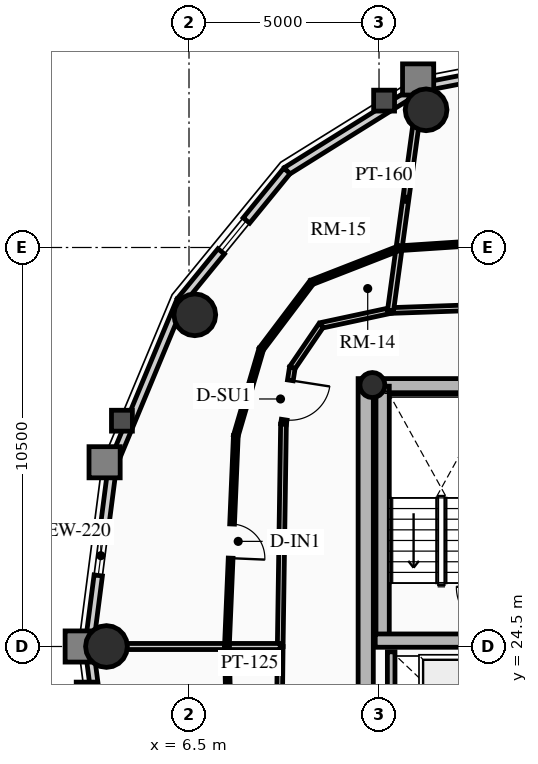
"""IFC4 building model, lengths in metres.
Left out: names, types, materials, properties, quantities, classifications, styles, units other than length and angle.
Written with IfcOpenShell. Run it as: python <this file> out.ifc"""

import sys

from ifc_helpers import new_model, si_unit, direction, frame, frame_2d, origin, origin_2d, place, context, subcontext, project, spatial, rectangle, circle, hollow_circle, extrude, source, transform, mapped, element, fill, save


model = new_model("IFC4")
c1 = context("Model", 3, precision=1e-05, world=origin(), true_north=direction((0.0, 1.0)))
c2 = subcontext(c1, "Body", "Model", "MODEL_VIEW")
j1 = project(units=[si_unit("LENGTHUNIT", "METRE"), si_unit("PLANEANGLEUNIT", "RADIAN")], contexts=[c1])
p1 = place(None, origin())
s1 = spatial("IfcSite", under=j1, at=p1, CompositionType="ELEMENT")
p2 = place(p1, origin())
s2 = spatial("IfcBuilding", under=s1, at=p2, CompositionType="ELEMENT")
p3 = place(p2, frame((0.0, 0.0, 226.05)))
s3 = spatial("IfcBuildingStorey", under=s2, at=p3, CompositionType="ELEMENT", Elevation=226.05)
p4 = place(p3, frame((11.15, 17.45, 0.0), z_axis=(0.0, 0.0, 1.0), x_axis=(0.0, 1.0, 0.0)))
e1 = element("IfcWall", 1, at=p4, inside=s3, PredefinedType="SHEAR", context=c2, shape_type="SweptSolid", body=[
    extrude(rectangle(XDim=14.1, YDim=0.4, at=frame_2d((7.05, 0.0))), origin(), (0.0, 0.0, 1.0), 3.2),
])
p5 = place(p3, frame((11.15, 31.35, 0.0), z_axis=(0.0, 0.0, 1.0), x_axis=(1.0, 0.0, 0.0)))
e2 = element("IfcWall", 2, at=p5, inside=s3, PredefinedType="SHEAR", context=c2, shape_type="SweptSolid", body=[
    extrude(rectangle(XDim=10.7, YDim=0.4, at=frame_2d((5.35, 0.0))), origin(), (0.0, 0.0, 1.0), 3.2),
])
m1 = source(origin(), c2, "Body", "SweptSolid", [
    extrude(rectangle(XDim=1.5, YDim=2.02, at=frame_2d((0.75, 1.01))), frame((0.0, 0.21, 0.0), z_axis=(0.0, -1.0, 0.0), x_axis=(1.0, 0.0, 0.0)), (0.0, 0.0, 1.0), 0.42),
])
p6 = place(p5, frame((4.6, 0.0, 0.0)))
e3 = element("IfcOpeningElement", 3, at=p6, cuts=e2, PredefinedType="OPENING", context=c2, shape_type="MappedRepresentation", body=[
    mapped(m1, transform((0.0, 0.0, 0.0), x_axis=(1.0, 0.0, 0.0), y_axis=(0.0, 1.0, 0.0), z_axis=(0.0, 0.0, 1.0), scale=1.0)),
])
p7 = place(p3, frame((11.595, 24.655, 0.0), z_axis=(0.0, 0.0, 1.0), x_axis=(0.0, 1.0, 0.0)))
e4 = element("IfcWall", 4, at=p7, inside=s3, PredefinedType="SHEAR", context=c2, shape_type="SweptSolid", body=[
    extrude(rectangle(XDim=6.695, YDim=0.35, at=frame_2d((3.348, 0.0))), origin(), (0.0, 0.0, 1.0), 3.2),
])
p8 = place(p3, frame((11.4, 24.655, 0.0), z_axis=(0.0, 0.0, 1.0), x_axis=(1.0, 0.0, 0.0)))
e5 = element("IfcWall", 5, at=p8, inside=s3, PredefinedType="SHEAR", context=c2, shape_type="SweptSolid", body=[
    extrude(rectangle(XDim=3.285, YDim=0.35, at=frame_2d((1.643, 0.0))), origin(), (0.0, 0.0, 1.0), 3.2),
])
p9 = place(p3, frame((11.325, 31.38, 0.0), z_axis=(0.0, 0.0, 1.0), x_axis=(1.0, 0.0, 0.0)))
e6 = element("IfcColumn", 6, at=p9, inside=s3, PredefinedType="COLUMN", context=c2, shape_type="SweptSolid", body=[
    extrude(hollow_circle(Radius=0.33, WallThickness=0.025, at=origin_2d()), origin(), (0.0, 0.0, 1.0), 3.2),
])
for number, where, z_axis, x_axis in (
    (7, (12.739, 38.623, 0.0), (0.0, 0.0, 1.0), (1.0, 0.0, 0.0)),
    (8, (6.653, 33.229, 0.0), (0.0, 0.0, 1.0), (1.0, 0.0, 0.0)),
    (9, (4.328, 24.5, 0.0), (0.0, 0.0, 1.0), (1.0, 0.0, 0.0)),
):
    element("IfcColumn", number, at=place(p3, frame(where, z_axis=z_axis, x_axis=x_axis)), inside=s3, PredefinedType="USERDEFINED", context=c2, shape_type="SweptSolid", body=[
        extrude(circle(Radius=0.55, at=origin_2d()), origin(), (0.0, 0.0, 1.0), 3.2),
    ])
p10 = place(p3, frame((12.597, 39.213, 0.0), z_axis=(0.0, 0.0, 1.0), x_axis=(0.981700307484, 0.190432419211, 0.0)))
e10 = element("IfcWall", 10, at=p10, inside=s3, PredefinedType="SOLIDWALL", context=c2, shape_type="SweptSolid", body=[
    extrude(rectangle(XDim=3.976, YDim=0.22, at=frame_2d((1.988, 0.0))), origin(), (0.0, 0.0, 1.0), 2.612),
])
m2 = source(origin(), c2, "Body", "SweptSolid", [
    extrude(rectangle(XDim=1.05, YDim=1.3, at=frame_2d((0.525, 0.65))), frame((0.0, 0.12, 0.0), z_axis=(0.0, -1.0, 0.0), x_axis=(1.0, 0.0, 0.0)), (0.0, 0.0, 1.0), 0.24),
])
p11 = place(p10, frame((1.463, 0.0, 0.65)))
e11 = element("IfcOpeningElement", 11, at=p11, cuts=e10, PredefinedType="OPENING", context=c2, shape_type="MappedRepresentation", body=[
    mapped(m2, transform((0.0, 0.0, 0.0), x_axis=(1.0, 0.0, 0.0), y_axis=(0.0, 1.0, 0.0), z_axis=(0.0, 0.0, 1.0), scale=1.0)),
])
p12 = place(p3, frame((9.076, 37.015, 0.0), z_axis=(0.0, 0.0, 1.0), x_axis=(0.848318713376, 0.529485939886, 0.0)))
e12 = element("IfcWall", 12, at=p12, inside=s3, PredefinedType="SOLIDWALL", context=c2, shape_type="SweptSolid", body=[
    extrude(rectangle(XDim=4.15, YDim=0.22, at=frame_2d((2.075, 0.0))), origin(), (0.0, 0.0, 1.0), 2.612),
])
p13 = place(p3, frame((6.282, 33.593, 0.0), z_axis=(0.0, 0.0, 1.0), x_axis=(0.632467166636, 0.774587169483, 0.0)))
e13 = element("IfcWall", 13, at=p13, inside=s3, PredefinedType="SOLIDWALL", context=c2, shape_type="SweptSolid", body=[
    extrude(rectangle(XDim=4.418, YDim=0.22, at=frame_2d((2.209, 0.0))), origin(), (0.0, 0.0, 1.0), 2.612),
])
p14 = place(p13, frame((1.684, 0.0, 0.65)))
e14 = element("IfcOpeningElement", 14, at=p14, cuts=e13, PredefinedType="OPENING", context=c2, shape_type="MappedRepresentation", body=[
    mapped(m2, transform((0.0, 0.0, 0.0), x_axis=(1.0, 0.0, 0.0), y_axis=(0.0, 1.0, 0.0), z_axis=(0.0, 0.0, 1.0), scale=1.0)),
])
p15 = place(p3, frame((4.488, 29.281, 0.0), z_axis=(0.0, 0.0, 1.0), x_axis=(0.384036305194, 0.923317993052, 0.0)))
e15 = element("IfcWall", 15, at=p15, inside=s3, PredefinedType="SOLIDWALL", context=c2, shape_type="SweptSolid", body=[
    extrude(rectangle(XDim=4.671, YDim=0.22, at=frame_2d((2.335, 0.0))), origin(), (0.0, 0.0, 1.0), 2.612),
])
p16 = place(p3, frame((3.87, 24.5, 0.0), z_axis=(0.0, 0.0, 1.0), x_axis=(0.128241318541, 0.991742993027, 0.0)))
e16 = element("IfcWall", 16, at=p16, inside=s3, PredefinedType="SOLIDWALL", context=c2, shape_type="SweptSolid", body=[
    extrude(rectangle(XDim=4.82, YDim=0.22, at=frame_2d((2.41, 0.0))), origin(), (0.0, 0.0, 1.0), 2.612),
])
p17 = place(p16, frame((1.885, 0.0, 0.65)))
e17 = element("IfcOpeningElement", 17, at=p17, cuts=e16, PredefinedType="OPENING", context=c2, shape_type="MappedRepresentation", body=[
    mapped(m2, transform((0.0, 0.0, 0.0), x_axis=(1.0, 0.0, 0.0), y_axis=(0.0, 1.0, 0.0), z_axis=(0.0, 0.0, 1.0), scale=1.0)),
])
p18 = place(p3, frame((4.488, 19.719, 0.0), z_axis=(0.0, 0.0, 1.0), x_axis=(-0.128241318541, 0.991742993027, 0.0)))
e18 = element("IfcWall", 18, at=p18, inside=s3, PredefinedType="SOLIDWALL", context=c2, shape_type="SweptSolid", body=[
    extrude(rectangle(XDim=4.82, YDim=0.22, at=frame_2d((2.41, 0.0))), origin(), (0.0, 0.0, 1.0), 2.612),
])
p19 = place(p3, frame((11.82, 21.92, 0.0), z_axis=(0.0, 0.0, 1.0), x_axis=(0.0, 1.0, 0.0)))
e19 = element("IfcWall", 19, at=p19, inside=s3, PredefinedType="SHEAR", context=c2, shape_type="SweptSolid", body=[
    extrude(rectangle(XDim=2.44, YDim=0.2, at=frame_2d((1.22, 0.0))), origin(), (0.0, 0.0, 1.0), 3.2),
])
p20 = place(p3, frame((18.082, 33.56, 0.0), z_axis=(0.0, 0.0, 1.0), x_axis=(-0.999399009709, -0.034664382185, 0.0)))
e20 = element("IfcWall", 20, at=p20, inside=s3, PredefinedType="PARTITIONING", context=c2, shape_type="SweptSolid", body=[
    extrude(rectangle(XDim=6.282, YDim=0.15, at=frame_2d((3.141, 0.0))), origin(), (0.0, 0.0, 1.0), 2.545),
])
p21 = place(p3, frame((11.803, 33.342, 0.0), z_axis=(0.0, 0.0, 1.0), x_axis=(-0.977750742783, -0.209770076483, 0.0)))
e21 = element("IfcWall", 21, at=p21, inside=s3, PredefinedType="PARTITIONING", context=c2, shape_type="SweptSolid", body=[
    extrude(rectangle(XDim=1.868, YDim=0.15, at=frame_2d((0.934, 0.0))), origin(), (0.0, 0.0, 1.0), 2.545),
])
p22 = place(p3, frame((9.977, 32.95, 0.0), z_axis=(0.0, 0.0, 1.0), x_axis=(-0.563291804539, -0.826258036535, 0.0)))
e22 = element("IfcWall", 22, at=p22, inside=s3, PredefinedType="PARTITIONING", context=c2, shape_type="SweptSolid", body=[
    extrude(rectangle(XDim=1.346, YDim=0.15, at=frame_2d((0.673, 0.0))), origin(), (0.0, 0.0, 1.0), 2.612),
])
p23 = place(p3, frame((9.219, 31.838, 0.0), z_axis=(0.0, 0.0, 1.0), x_axis=(-0.154065528966, -0.98806063214, 0.0)))
e23 = element("IfcWall", 23, at=p23, inside=s3, PredefinedType="PARTITIONING", context=c2, shape_type="SweptSolid", body=[
    extrude(rectangle(XDim=1.507, YDim=0.15, at=frame_2d((0.753, 0.0))), origin(), (0.0, 0.0, 1.0), 2.545),
])
m3 = source(origin(), c2, "Body", "SweptSolid", [
    extrude(rectangle(XDim=1.05, YDim=2.015, at=frame_2d((0.525, 1.007))), frame((0.0, 0.085, 0.0), z_axis=(0.0, -1.0, 0.0), x_axis=(1.0, 0.0, 0.0)), (0.0, 0.0, 1.0), 0.17),
])
p24 = place(p23, frame((0.337, 0.0, 0.0)))
e24 = element("IfcOpeningElement", 24, at=p24, cuts=e23, PredefinedType="OPENING", context=c2, shape_type="MappedRepresentation", body=[
    mapped(m3, transform((0.0, 0.0, 0.0), x_axis=(1.0, 0.0, 0.0), y_axis=(0.0, 1.0, 0.0), z_axis=(0.0, 0.0, 1.0), scale=1.0)),
])
p25 = place(p3, frame((8.986, 30.349, 0.0), z_axis=(0.0, 0.0, 1.0), x_axis=(-0.014775478218, -0.999890836663, 0.0)))
e25 = element("IfcWall", 25, at=p25, inside=s3, PredefinedType="PARTITIONING", context=c2, shape_type="SweptSolid", body=[
    extrude(rectangle(XDim=5.849, YDim=0.15, at=frame_2d((2.925, 0.0))), origin(), (0.0, 0.0, 1.0), 2.975),
])
p26 = place(p3, frame((8.9, 24.5, 0.0), z_axis=(0.0, 0.0, 1.0), x_axis=(-0.011416369353, -0.999934831132, 0.0)))
e26 = element("IfcWall", 26, at=p26, inside=s3, PredefinedType="PARTITIONING", context=c2, shape_type="SweptSolid", body=[
    extrude(rectangle(XDim=5.967, YDim=0.15, at=frame_2d((2.983, 0.0))), origin(), (0.0, 0.0, 1.0), 2.612),
])
p27 = place(p3, frame((11.803, 33.342, 0.0), z_axis=(0.0, 0.0, 1.0), x_axis=(0.135452591041, 0.990783828885, 0.0)))
e27 = element("IfcWall", 27, at=p27, inside=s3, PredefinedType="PARTITIONING", context=c2, shape_type="SweptSolid", body=[
    extrude(rectangle(XDim=5.906, YDim=0.16, at=frame_2d((2.953, 0.0))), origin(), (0.0, 0.0, 1.0), 2.612),
])
p28 = place(p3, frame((8.9, 24.5, 0.0), z_axis=(0.0, 0.0, 1.0), x_axis=(-1.0, 0.0, 0.0)))
e28 = element("IfcWall", 28, at=p28, inside=s3, PredefinedType="PARTITIONING", context=c2, shape_type="SweptSolid", body=[
    extrude(rectangle(XDim=5.01, YDim=0.16, at=frame_2d((2.505, 0.0))), origin(), (0.0, 0.0, 1.0), 2.612),
])
p29 = place(p3, frame((17.639, 35.349, 0.0), z_axis=(0.0, 0.0, 1.0), x_axis=(-0.997849042159, -0.065553711275, 0.0)))
e29 = element("IfcWall", 29, at=p29, inside=s3, PredefinedType="PARTITIONING", context=c2, shape_type="SweptSolid", body=[
    extrude(rectangle(XDim=5.624, YDim=0.125, at=frame_2d((2.812, 0.0))), origin(), (0.0, 0.0, 1.0), 2.545),
])
m4 = source(origin(), c2, "Body", "SweptSolid", [
    extrude(rectangle(XDim=0.9, YDim=2.005, at=frame_2d((0.45, 1.002))), frame((0.0, 0.073, 0.0), z_axis=(0.0, -1.0, 0.0), x_axis=(1.0, 0.0, 0.0)), (0.0, 0.0, 1.0), 0.145),
])
p30 = place(p29, frame((2.362, 0.0, 0.0)))
e30 = element("IfcOpeningElement", 30, at=p30, cuts=e29, PredefinedType="OPENING", context=c2, shape_type="MappedRepresentation", body=[
    mapped(m4, transform((0.0, 0.0, 0.0), x_axis=(1.0, 0.0, 0.0), y_axis=(0.0, 1.0, 0.0), z_axis=(0.0, 0.0, 1.0), scale=1.0)),
])
p31 = place(p3, frame((12.027, 34.98, 0.0), z_axis=(0.0, 0.0, 1.0), x_axis=(-0.931701760683, -0.363224213317, 0.0)))
e31 = element("IfcWall", 31, at=p31, inside=s3, PredefinedType="PARTITIONING", context=c2, shape_type="SweptSolid", body=[
    extrude(rectangle(XDim=2.468, YDim=0.125, at=frame_2d((1.234, 0.0))), origin(), (0.0, 0.0, 1.0), 2.545),
])
p32 = place(p3, frame((9.728, 34.084, 0.0), z_axis=(0.0, 0.0, 1.0), x_axis=(-0.602426891997, -0.798174066103, 0.0)))
e32 = element("IfcWall", 32, at=p32, inside=s3, PredefinedType="PARTITIONING", context=c2, shape_type="SweptSolid", body=[
    extrude(rectangle(XDim=2.203, YDim=0.125, at=frame_2d((1.101, 0.0))), origin(), (0.0, 0.0, 1.0), 2.612),
])
p33 = place(p3, frame((8.401, 32.326, 0.0), z_axis=(0.0, 0.0, 1.0), x_axis=(-0.281681886596, -0.959507850288, 0.0)))
e33 = element("IfcWall", 33, at=p33, inside=s3, PredefinedType="PARTITIONING", context=c2, shape_type="SweptSolid", body=[
    extrude(rectangle(XDim=2.374, YDim=0.125, at=frame_2d((1.187, 0.0))), origin(), (0.0, 0.0, 1.0), 2.545),
])
p34 = place(p3, frame((7.732, 30.048, 0.0), z_axis=(0.0, 0.0, 1.0), x_axis=(-0.042296211955, -0.999105114817, 0.0)))
e34 = element("IfcWall", 34, at=p34, inside=s3, PredefinedType="PARTITIONING", context=c2, shape_type="SweptSolid", body=[
    extrude(rectangle(XDim=5.553, YDim=0.125, at=frame_2d((2.776, 0.0))), origin(), (0.0, 0.0, 1.0), 2.975),
])
p35 = place(p34, frame((2.326, 0.0, 0.0)))
e35 = element("IfcOpeningElement", 35, at=p35, cuts=e34, PredefinedType="OPENING", context=c2, shape_type="MappedRepresentation", body=[
    mapped(m4, transform((0.0, 0.0, 0.0), x_axis=(1.0, 0.0, 0.0), y_axis=(0.0, 1.0, 0.0), z_axis=(0.0, 0.0, 1.0), scale=1.0)),
])
p36 = place(p3, frame((7.497, 24.5, 0.0), z_axis=(0.0, 0.0, 1.0), x_axis=(0.021927972859, -0.999759553096, 0.0)))
e36 = element("IfcWall", 36, at=p36, inside=s3, PredefinedType="PARTITIONING", context=c2, shape_type="SweptSolid", body=[
    extrude(rectangle(XDim=5.634, YDim=0.125, at=frame_2d((2.817, 0.0))), origin(), (0.0, 0.0, 1.0), 2.612),
])
p37 = place(p36, frame((2.367, 0.0, 0.0)))
e37 = element("IfcOpeningElement", 37, at=p37, cuts=e36, PredefinedType="OPENING", context=c2, shape_type="MappedRepresentation", body=[
    mapped(m4, transform((0.0, 0.0, 0.0), x_axis=(1.0, 0.0, 0.0), y_axis=(0.0, 1.0, 0.0), z_axis=(0.0, 0.0, 1.0), scale=1.0)),
])
m5 = source(origin(), c2, "Body", "SweptSolid", [
    extrude(rectangle(XDim=1.05, YDim=1.3, at=frame_2d((0.525, 0.65))), frame((0.0, 0.03, 0.0), z_axis=(0.0, -1.0, 0.0), x_axis=(1.0, 0.0, 0.0)), (0.0, 0.0, 1.0), 0.06),
])
p38 = place(p14, origin())
e38 = element("IfcWindow", 38, at=p38, inside=s3, PartitioningType="SINGLE_PANEL", PredefinedType="WINDOW", context=c2, shape_type="MappedRepresentation", body=[
    mapped(m5, transform((0.0, 0.0, 0.0), x_axis=(1.0, 0.0, 0.0), y_axis=(0.0, 1.0, 0.0), z_axis=(0.0, 0.0, 1.0), scale=1.0)),
])
fill(e14, e38)
p39 = place(p17, origin())
e39 = element("IfcWindow", 39, at=p39, inside=s3, PartitioningType="SINGLE_PANEL", PredefinedType="WINDOW", context=c2, shape_type="MappedRepresentation", body=[
    mapped(m5, transform((0.0, 0.0, 0.0), x_axis=(1.0, 0.0, 0.0), y_axis=(0.0, 1.0, 0.0), z_axis=(0.0, 0.0, 1.0), scale=1.0)),
])
fill(e17, e39)
m6 = source(origin(), c2, "Body", "SweptSolid", [
    extrude(rectangle(XDim=1.05, YDim=2.015, at=frame_2d((0.525, 1.007))), frame((0.0, 0.025, 0.0), z_axis=(0.0, -1.0, 0.0), x_axis=(1.0, 0.0, 0.0)), (0.0, 0.0, 1.0), 0.05),
])
p40 = place(p24, origin())
e40 = element("IfcDoor", 40, at=p40, inside=s3, OperationType="SINGLE_SWING_LEFT", PredefinedType="DOOR", context=c2, shape_type="MappedRepresentation", body=[
    mapped(m6, transform((0.0, 0.0, 0.0), x_axis=(1.0, 0.0, 0.0), y_axis=(0.0, 1.0, 0.0), z_axis=(0.0, 0.0, 1.0), scale=1.0)),
])
fill(e24, e40)
m7 = source(origin(), c2, "Body", "SweptSolid", [
    extrude(rectangle(XDim=0.9, YDim=2.005, at=frame_2d((0.45, 1.002))), frame((0.0, 0.025, 0.0), z_axis=(0.0, -1.0, 0.0), x_axis=(1.0, 0.0, 0.0)), (0.0, 0.0, 1.0), 0.05),
])
p41 = place(p35, origin())
e41 = element("IfcDoor", 41, at=p41, inside=s3, OperationType="SINGLE_SWING_RIGHT", PredefinedType="DOOR", context=c2, shape_type="MappedRepresentation", body=[
    mapped(m7, transform((0.0, 0.0, 0.0), x_axis=(1.0, 0.0, 0.0), y_axis=(0.0, 1.0, 0.0), z_axis=(0.0, 0.0, 1.0), scale=1.0)),
])
fill(e35, e41)
save(model, sys.argv[1])
